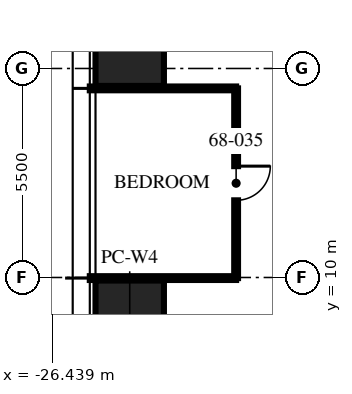
"""IFC4 building model, lengths in metres.
Left out: names, types, materials, properties, quantities, classifications, styles, units other than length and angle.
Written with IfcOpenShell. Run it as: python <this file> out.ifc"""

import sys

from ifc_helpers import new_model, si_unit, direction, frame, frame_2d, origin, origin_2d, place, context, subcontext, project, spatial, rectangle, hollow_rectangle, extrude, element, fill, save


model = new_model("IFC4")
c1 = context("Model", 3, precision=1e-05, world=origin(), true_north=direction((0.0, 1.0)))
c2 = subcontext(c1, "Body", "Model", "MODEL_VIEW")
j1 = project(units=[si_unit("LENGTHUNIT", "METRE"), si_unit("PLANEANGLEUNIT", "RADIAN")], contexts=[c1])
p1 = place(None, origin())
s1 = spatial("IfcSite", under=j1, at=p1, CompositionType="ELEMENT")
p2 = place(p1, origin())
s2 = spatial("IfcBuilding", under=s1, at=p2, CompositionType="ELEMENT")
p3 = place(p2, frame((0.0, 0.0, 270.75)))
s3 = spatial("IfcBuildingStorey", under=s2, at=p3, CompositionType="ELEMENT", Elevation=270.75)
for number, where, z_axis, x_axis in (
    (1, (-24.4, 8.32, 0.0), (0.0, 0.0, 1.0), (0.0, 1.0, 0.0)),
    (2, (-24.4, 16.64, 0.0), (0.0, 0.0, 1.0), (0.0, 1.0, 0.0)),
):
    element("IfcColumn", number, at=place(p3, frame(where, z_axis=z_axis, x_axis=x_axis)), inside=s3, PredefinedType="COLUMN", context=c2, shape_type="SweptSolid", body=[
        extrude(hollow_rectangle(XDim=3.2, YDim=1.8, WallThickness=0.14, at=origin_2d()), origin(), (0.0, 0.0, 1.0), 3.75),
    ])
for number, where, z_axis, x_axis in (
    (3, (-21.6, 14.976, 0.0), (0.0, 0.0, 1.0), (-1.0, 0.0, 0.0)),
    (4, (-21.6, 9.984, 0.0), (0.0, 0.0, 1.0), (-1.0, 0.0, 0.0)),
):
    element("IfcWall", number, at=place(p3, frame(where, z_axis=z_axis, x_axis=x_axis)), inside=s3, PredefinedType="PARTITIONING", context=c2, shape_type="SweptSolid", body=[
        extrude(rectangle(XDim=3.85, YDim=0.1, at=frame_2d((1.925, 0.0))), origin(), (0.0, 0.0, 1.0), 2.81),
    ])
p4 = place(p3, frame((-21.6, 14.976, 0.0), z_axis=(0.0, 0.0, 1.0), x_axis=(0.0, -1.0, 0.0)))
e5 = element("IfcWall", 5, at=p4, inside=s3, PredefinedType="PARTITIONING", context=c2, shape_type="SweptSolid", body=[
    extrude(rectangle(XDim=4.992, YDim=0.1, at=frame_2d((2.496, 0.0))), origin(), (0.0, 0.0, 1.0), 2.71),
])
p5 = place(p4, frame((2.046, 0.0, 0.0)))
e6 = element("IfcOpeningElement", 6, at=p5, cuts=e5, PredefinedType="OPENING", context=c2, shape_type="SweptSolid", body=[
    extrude(rectangle(XDim=0.9, YDim=2.1, at=frame_2d((0.45, 1.05))), frame((0.0, 0.06, 0.0), z_axis=(0.0, -1.0, 0.0), x_axis=(1.0, 0.0, 0.0)), (0.0, 0.0, 1.0), 0.12),
])
p6 = place(p5, origin())
e7 = element("IfcDoor", 7, at=p6, inside=s3, OperationType="SINGLE_SWING_LEFT", PredefinedType="DOOR", context=c2, shape_type="SweptSolid", body=[
    extrude(rectangle(XDim=0.9, YDim=2.1, at=frame_2d((0.45, 1.05))), frame((0.0, 0.025, 0.0), z_axis=(0.0, -1.0, 0.0), x_axis=(1.0, 0.0, 0.0)), (0.0, 0.0, 1.0), 0.05),
])
fill(e6, e7)
save(model, sys.argv[1])
